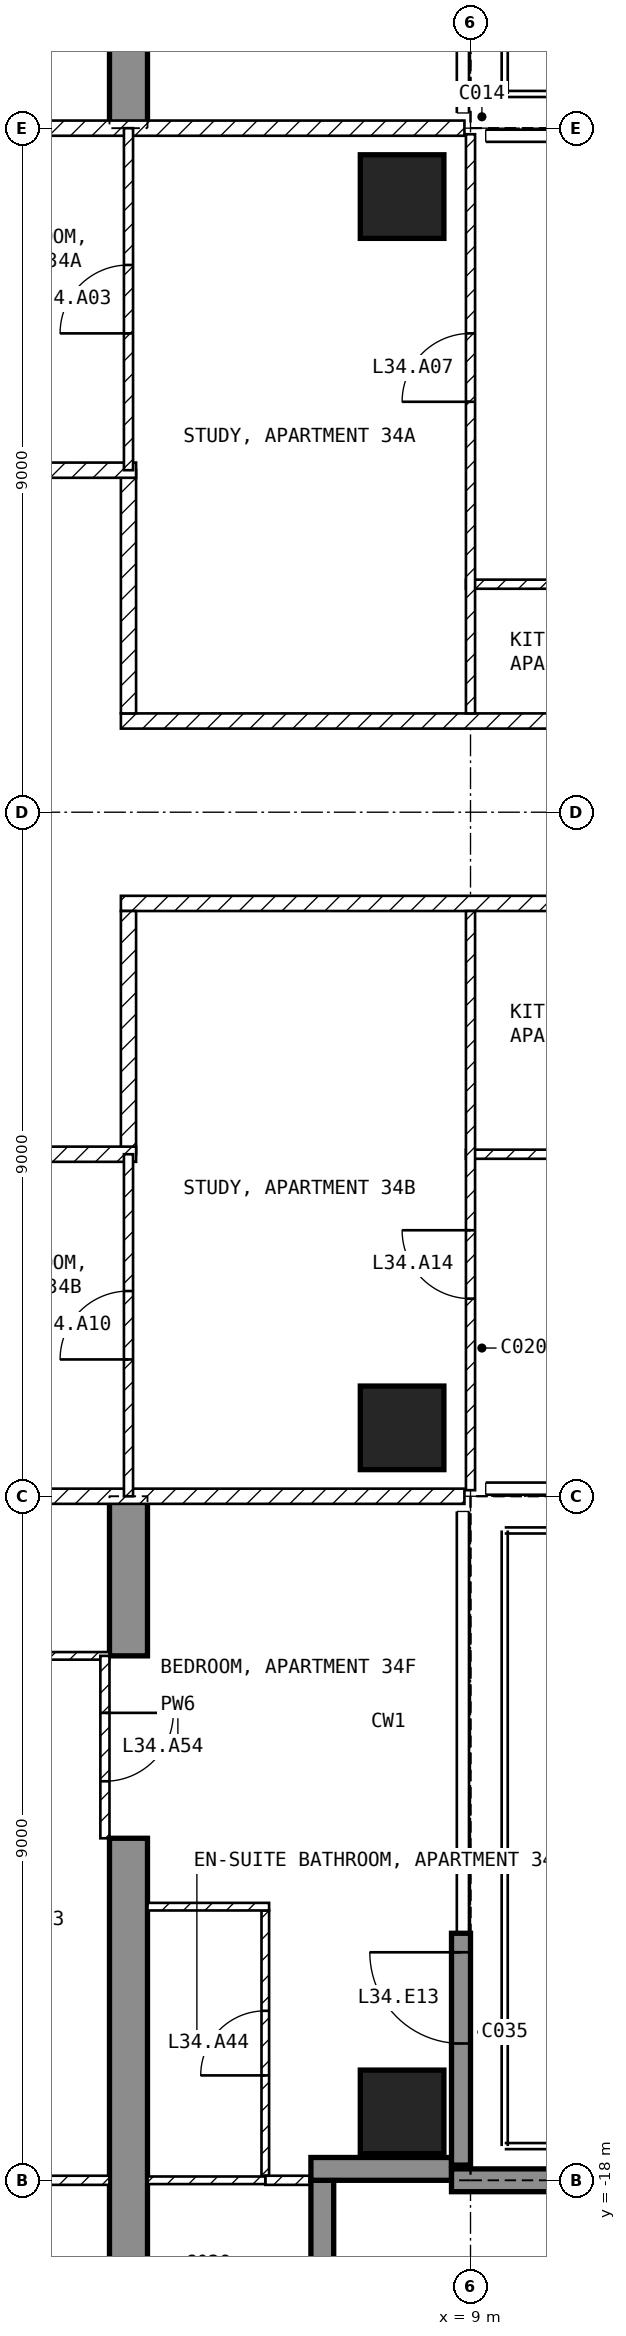
"""IFC4 building model, lengths in metres.
Left out: names, types, materials, properties, quantities, classifications, styles, units other than length and angle.
Written with IfcOpenShell. Run it as: python <this file> out.ifc"""

import sys

from ifc_helpers import new_model, si_unit, direction, frame, frame_2d, origin, origin_2d, place, context, subcontext, project, spatial, polyline, rectangle, outline, extrude, element, fill, save


model = new_model("IFC4")
c1 = context("Model", 3, precision=1e-05, world=origin(), true_north=direction((0.0, 1.0)))
c2 = subcontext(c1, "Body", "Model", "MODEL_VIEW")
j1 = project(units=[si_unit("LENGTHUNIT", "METRE"), si_unit("PLANEANGLEUNIT", "RADIAN")], contexts=[c1])
p1 = place(None, origin())
s1 = spatial("IfcSite", under=j1, at=p1, CompositionType="ELEMENT")
p2 = place(p1, origin())
s2 = spatial("IfcBuilding", under=s1, at=p2, CompositionType="ELEMENT")
p3 = place(p2, frame((0.0, 0.0, 140.9)))
s3 = spatial("IfcBuildingStorey", under=s2, at=p3, CompositionType="ELEMENT", Elevation=140.9)
for number, where, z_axis, x_axis in (
    (1, (8.1, -17.1, -0.25), (0.0, 0.0, 1.0), (1.0, 0.0, 0.0)),
    (2, (8.1, -8.1, -0.25), (0.0, 0.0, 1.0), (1.0, 0.0, 0.0)),
    (3, (8.1, 8.1, -0.25), (0.0, 0.0, 1.0), (1.0, 0.0, 0.0)),
):
    element("IfcColumn", number, at=place(p3, frame(where, z_axis=z_axis, x_axis=x_axis)), inside=s3, PredefinedType="COLUMN", context=c2, shape_type="SweptSolid", body=[
        extrude(rectangle(XDim=1.1, YDim=1.1, at=origin_2d()), origin(), (0.0, 0.0, 1.0), 3.5),
    ])
p4 = place(p3, frame((4.25, -20.15, -0.25), z_axis=(1.0, 0.0, 0.0), x_axis=(0.0, 1.0, 0.0)))
e4 = element("IfcWall", 4, at=p4, inside=s3, PredefinedType="SHEAR", context=c2, shape_type="SweptSolid", body=[
    extrude(outline(polyline([(0.0, 0.0), (6.65, 0.0), (6.65, 2.65), (9.05, 2.65), (9.05, 0.0), (11.15, 0.0), (11.15, 3.5), (0.0, 3.5), (0.0, 0.0)])), origin(), (0.0, 0.0, 1.0), 0.5),
])
p5 = place(p3, frame((4.25, 9.0, -0.25), z_axis=(1.0, 0.0, 0.0), x_axis=(0.0, 1.0, 0.0)))
e5 = element("IfcWall", 5, at=p5, inside=s3, PredefinedType="SHEAR", context=c2, shape_type="SweptSolid", body=[
    extrude(outline(polyline([(0.0, 0.0), (2.1, 0.0), (2.1, 2.65), (4.5, 2.65), (4.5, 0.0), (9.9, 0.0), (9.9, 2.65), (12.3, 2.65), (12.3, 0.0), (16.55, 0.0), (16.55, 3.5), (0.0, 3.5), (0.0, 0.0)])), origin(), (0.0, 0.0, 1.0), 0.5),
])
p6 = place(p3, frame((8.875, -17.8, 0.0), z_axis=(0.0, 0.0, 1.0), x_axis=(0.0, 1.0, 0.0)))
e6 = element("IfcWall", 6, at=p6, inside=s3, PredefinedType="SOLIDWALL", context=c2, shape_type="SweptSolid", body=[
    extrude(rectangle(XDim=3.05, YDim=0.25, at=frame_2d((1.525, 0.0))), origin(), (0.0, 0.0, 1.0), 3.25),
])
p7 = place(p6, frame((1.6, 0.0, 0.0)))
e7 = element("IfcOpeningElement", 7, at=p7, cuts=e6, PredefinedType="OPENING", context=c2, shape_type="SweptSolid", body=[
    extrude(rectangle(XDim=1.2, YDim=2.4, at=frame_2d((0.6, 1.2))), frame((0.0, 0.135, 0.0), z_axis=(0.0, -1.0, 0.0), x_axis=(1.0, 0.0, 0.0)), (0.0, 0.0, 1.0), 0.27),
])
p8 = place(p3, frame((7.05, -19.8, 0.0), z_axis=(0.0, 0.0, 1.0), x_axis=(0.0, 1.0, 0.0)))
e8 = element("IfcWall", 8, at=p8, inside=s3, PredefinedType="SOLIDWALL", context=c2, shape_type="SweptSolid", body=[
    extrude(rectangle(XDim=1.8, YDim=0.3, at=frame_2d((0.9, 0.0))), origin(), (0.0, 0.0, 1.0), 3.25),
])
p9 = place(p3, frame((6.9, -17.85, 0.0), z_axis=(0.0, 0.0, 1.0), x_axis=(1.0, 0.0, 0.0)))
e9 = element("IfcWall", 9, at=p9, inside=s3, PredefinedType="SOLIDWALL", context=c2, shape_type="SweptSolid", body=[
    extrude(rectangle(XDim=1.85, YDim=0.3, at=frame_2d((0.925, 0.0))), origin(), (0.0, 0.0, 1.0), 3.25),
])
p10 = place(p3, frame((8.75, -18.0, 0.0), z_axis=(0.0, 0.0, 1.0), x_axis=(1.0, 0.0, 0.0)))
e10 = element("IfcWall", 10, at=p10, inside=s3, PredefinedType="SOLIDWALL", context=c2, shape_type="SweptSolid", body=[
    extrude(rectangle(XDim=2.99, YDim=0.3, at=frame_2d((1.495, 0.0))), origin(), (0.0, 0.0, 1.0), 3.25),
])
p11 = place(p3, frame((4.4, 1.2, 0.0), z_axis=(0.0, 0.0, 1.0), x_axis=(1.0, 0.0, 0.0)))
e11 = element("IfcWall", 11, at=p11, inside=s3, PredefinedType="PARTITIONING", context=c2, shape_type="SweptSolid", body=[
    extrude(rectangle(XDim=17.2, YDim=0.2, at=frame_2d((8.6, 0.0))), origin(), (0.0, 0.0, 1.0), 3.25),
])
p12 = place(p11, frame((8.3, 0.0, 0.0)))
e12 = element("IfcOpeningElement", 12, at=p12, cuts=e11, PredefinedType="OPENING", context=c2, shape_type="SweptSolid", body=[
    extrude(rectangle(XDim=1.0, YDim=2.1, at=frame_2d((0.5, 1.05))), frame((0.0, 0.11, 0.0), z_axis=(0.0, -1.0, 0.0), x_axis=(1.0, 0.0, 0.0)), (0.0, 0.0, 1.0), 0.22),
])
p13 = place(p3, frame((4.5, 4.5, 0.0), z_axis=(0.0, 0.0, 1.0), x_axis=(0.0, -1.0, 0.0)))
e13 = element("IfcWall", 13, at=p13, inside=s3, PredefinedType="PARTITIONING", context=c2, shape_type="SweptSolid", body=[
    extrude(rectangle(XDim=3.2, YDim=0.2, at=frame_2d((1.6, 0.0))), origin(), (0.0, 0.0, 1.0), 3.25),
])
p14 = place(p3, frame((1.1, 4.5, 0.0), z_axis=(0.0, 0.0, 1.0), x_axis=(1.0, 0.0, 0.0)))
e14 = element("IfcWall", 14, at=p14, inside=s3, PredefinedType="PARTITIONING", context=c2, shape_type="SweptSolid", body=[
    extrude(rectangle(XDim=3.5, YDim=0.2, at=frame_2d((1.75, 0.0))), origin(), (0.0, 0.0, 1.0), 3.25),
])
p15 = place(p3, frame((21.6, -1.2, 0.0), z_axis=(0.0, 0.0, 1.0), x_axis=(-1.0, 0.0, 0.0)))
e15 = element("IfcWall", 15, at=p15, inside=s3, PredefinedType="PARTITIONING", context=c2, shape_type="SweptSolid", body=[
    extrude(rectangle(XDim=17.2, YDim=0.2, at=frame_2d((8.6, 0.0))), origin(), (0.0, 0.0, 1.0), 3.25),
])
p16 = place(p15, frame((7.9, 0.0, 0.0)))
e16 = element("IfcOpeningElement", 16, at=p16, cuts=e15, PredefinedType="OPENING", context=c2, shape_type="SweptSolid", body=[
    extrude(rectangle(XDim=1.0, YDim=2.1, at=frame_2d((0.5, 1.05))), frame((0.0, 0.11, 0.0), z_axis=(0.0, -1.0, 0.0), x_axis=(1.0, 0.0, 0.0)), (0.0, 0.0, 1.0), 0.22),
])
p17 = place(p3, frame((4.5, -1.3, 0.0), z_axis=(0.0, 0.0, 1.0), x_axis=(0.0, -1.0, 0.0)))
e17 = element("IfcWall", 17, at=p17, inside=s3, PredefinedType="PARTITIONING", context=c2, shape_type="SweptSolid", body=[
    extrude(rectangle(XDim=3.2, YDim=0.2, at=frame_2d((1.6, 0.0))), origin(), (0.0, 0.0, 1.0), 3.25),
])
p18 = place(p3, frame((4.6, -4.5, 0.0), z_axis=(0.0, 0.0, 1.0), x_axis=(-1.0, 0.0, 0.0)))
e18 = element("IfcWall", 18, at=p18, inside=s3, PredefinedType="PARTITIONING", context=c2, shape_type="SweptSolid", body=[
    extrude(rectangle(XDim=3.5, YDim=0.2, at=frame_2d((1.75, 0.0))), origin(), (0.0, 0.0, 1.0), 3.25),
])
p19 = place(p3, frame((-8.92, 9.0, 0.0), z_axis=(0.0, 0.0, 1.0), x_axis=(1.0, 0.0, 0.0)))
e19 = element("IfcWall", 19, at=p19, inside=s3, PredefinedType="PARTITIONING", context=c2, shape_type="SweptSolid", body=[
    extrude(rectangle(XDim=17.84, YDim=0.2, at=frame_2d((8.92, 0.0))), origin(), (0.0, 0.0, 1.0), 3.25),
])
p20 = place(p19, frame((8.42, 0.0, 0.0)))
e20 = element("IfcOpeningElement", 20, at=p20, cuts=e19, PredefinedType="OPENING", context=c2, shape_type="SweptSolid", body=[
    extrude(rectangle(XDim=1.0, YDim=2.1, at=frame_2d((0.5, 1.05))), frame((0.0, 0.11, 0.0), z_axis=(0.0, -1.0, 0.0), x_axis=(1.0, 0.0, 0.0)), (0.0, 0.0, 1.0), 0.22),
])
p21 = place(p3, frame((8.92, -9.0, 0.0), z_axis=(0.0, 0.0, 1.0), x_axis=(-1.0, 0.0, 0.0)))
e21 = element("IfcWall", 21, at=p21, inside=s3, PredefinedType="PARTITIONING", context=c2, shape_type="SweptSolid", body=[
    extrude(rectangle(XDim=17.84, YDim=0.2, at=frame_2d((8.92, 0.0))), origin(), (0.0, 0.0, 1.0), 3.25),
])
p22 = place(p21, frame((8.42, 0.0, 0.0)))
e22 = element("IfcOpeningElement", 22, at=p22, cuts=e21, PredefinedType="OPENING", context=c2, shape_type="SweptSolid", body=[
    extrude(rectangle(XDim=1.0, YDim=2.1, at=frame_2d((0.5, 1.05))), frame((0.0, 0.11, 0.0), z_axis=(0.0, -1.0, 0.0), x_axis=(1.0, 0.0, 0.0)), (0.0, 0.0, 1.0), 0.22),
])
p23 = place(p3, frame((8.94, 3.0, 0.0), z_axis=(0.0, 0.0, 1.0), x_axis=(1.0, 0.0, 0.0)))
e23 = element("IfcWall", 23, at=p23, inside=s3, PredefinedType="PARTITIONING", context=c2, shape_type="SweptSolid", body=[
    extrude(rectangle(XDim=7.86, YDim=0.12, at=frame_2d((3.93, 0.0))), origin(), (0.0, 0.0, 1.0), 3.25),
])
p24 = place(p23, frame((3.81, 0.0, 0.0)))
e24 = element("IfcOpeningElement", 24, at=p24, cuts=e23, PredefinedType="OPENING", context=c2, shape_type="SweptSolid", body=[
    extrude(rectangle(XDim=0.9, YDim=2.1, at=frame_2d((0.45, 1.05))), frame((0.0, 0.07, 0.0), z_axis=(0.0, -1.0, 0.0), x_axis=(1.0, 0.0, 0.0)), (0.0, 0.0, 1.0), 0.14),
])
p25 = place(p3, frame((9.0, 1.3, 0.0), z_axis=(0.0, 0.0, 1.0), x_axis=(0.0, 1.0, 0.0)))
e25 = element("IfcWall", 25, at=p25, inside=s3, PredefinedType="PARTITIONING", context=c2, shape_type="SweptSolid", body=[
    extrude(rectangle(XDim=7.62, YDim=0.12, at=frame_2d((3.81, 0.0))), origin(), (0.0, 0.0, 1.0), 3.25),
])
p26 = place(p25, frame((4.1, 0.0, 0.0)))
e26 = element("IfcOpeningElement", 26, at=p26, cuts=e25, PredefinedType="OPENING", context=c2, shape_type="SweptSolid", body=[
    extrude(rectangle(XDim=0.9, YDim=2.1, at=frame_2d((0.45, 1.05))), frame((0.0, 0.07, 0.0), z_axis=(0.0, -1.0, 0.0), x_axis=(1.0, 0.0, 0.0)), (0.0, 0.0, 1.0), 0.14),
])
p27 = place(p3, frame((4.5, 4.5, 0.0), z_axis=(0.0, 0.0, 1.0), x_axis=(0.0, 1.0, 0.0)))
e27 = element("IfcWall", 27, at=p27, inside=s3, PredefinedType="PARTITIONING", context=c2, shape_type="SweptSolid", body=[
    extrude(rectangle(XDim=4.5, YDim=0.12, at=frame_2d((2.25, 0.0))), origin(), (0.0, 0.0, 1.0), 3.25),
])
p28 = place(p27, frame((1.8, 0.0, 0.0)))
e28 = element("IfcOpeningElement", 28, at=p28, cuts=e27, PredefinedType="OPENING", context=c2, shape_type="SweptSolid", body=[
    extrude(rectangle(XDim=0.9, YDim=2.1, at=frame_2d((0.45, 1.05))), frame((0.0, 0.07, 0.0), z_axis=(0.0, -1.0, 0.0), x_axis=(1.0, 0.0, 0.0)), (0.0, 0.0, 1.0), 0.14),
])
p29 = place(p3, frame((16.8, -4.5, 0.0), z_axis=(0.0, 0.0, 1.0), x_axis=(-1.0, 0.0, 0.0)))
e29 = element("IfcWall", 29, at=p29, inside=s3, PredefinedType="PARTITIONING", context=c2, shape_type="SweptSolid", body=[
    extrude(rectangle(XDim=7.86, YDim=0.12, at=frame_2d((3.93, 0.0))), origin(), (0.0, 0.0, 1.0), 3.25),
])
p30 = place(p29, frame((3.15, 0.0, 0.0)))
e30 = element("IfcOpeningElement", 30, at=p30, cuts=e29, PredefinedType="OPENING", context=c2, shape_type="SweptSolid", body=[
    extrude(rectangle(XDim=0.9, YDim=2.1, at=frame_2d((0.45, 1.05))), frame((0.0, 0.07, 0.0), z_axis=(0.0, -1.0, 0.0), x_axis=(1.0, 0.0, 0.0)), (0.0, 0.0, 1.0), 0.14),
])
p31 = place(p3, frame((9.0, -8.92, 0.0), z_axis=(0.0, 0.0, 1.0), x_axis=(0.0, 1.0, 0.0)))
e31 = element("IfcWall", 31, at=p31, inside=s3, PredefinedType="PARTITIONING", context=c2, shape_type="SweptSolid", body=[
    extrude(rectangle(XDim=7.62, YDim=0.12, at=frame_2d((3.81, 0.0))), origin(), (0.0, 0.0, 1.0), 3.25),
])
p32 = place(p31, frame((2.52, 0.0, 0.0)))
e32 = element("IfcOpeningElement", 32, at=p32, cuts=e31, PredefinedType="OPENING", context=c2, shape_type="SweptSolid", body=[
    extrude(rectangle(XDim=0.9, YDim=2.1, at=frame_2d((0.45, 1.05))), frame((0.0, 0.07, 0.0), z_axis=(0.0, -1.0, 0.0), x_axis=(1.0, 0.0, 0.0)), (0.0, 0.0, 1.0), 0.14),
])
p33 = place(p3, frame((4.5, -9.0, 0.0), z_axis=(0.0, 0.0, 1.0), x_axis=(0.0, 1.0, 0.0)))
e33 = element("IfcWall", 33, at=p33, inside=s3, PredefinedType="PARTITIONING", context=c2, shape_type="SweptSolid", body=[
    extrude(rectangle(XDim=4.5, YDim=0.12, at=frame_2d((2.25, 0.0))), origin(), (0.0, 0.0, 1.0), 3.25),
])
p34 = place(p33, frame((1.8, 0.0, 0.0)))
e34 = element("IfcOpeningElement", 34, at=p34, cuts=e33, PredefinedType="OPENING", context=c2, shape_type="SweptSolid", body=[
    extrude(rectangle(XDim=0.9, YDim=2.1, at=frame_2d((0.45, 1.05))), frame((0.0, 0.07, 0.0), z_axis=(0.0, -1.0, 0.0), x_axis=(1.0, 0.0, 0.0)), (0.0, 0.0, 1.0), 0.14),
])
p35 = place(p3, frame((4.25, -11.1, 0.0), z_axis=(0.0, 0.0, 1.0), x_axis=(-1.0, 0.0, 0.0)))
e35 = element("IfcWall", 35, at=p35, inside=s3, PredefinedType="PARTITIONING", context=c2, shape_type="SweptSolid", body=[
    extrude(rectangle(XDim=2.15, YDim=0.1, at=frame_2d((1.075, 0.0))), origin(), (0.0, 0.0, 1.0), 3.25),
])
p36 = place(p3, frame((4.25, -18.0, 0.0), z_axis=(0.0, 0.0, 1.0), x_axis=(-1.0, 0.0, 0.0)))
e36 = element("IfcWall", 36, at=p36, inside=s3, PredefinedType="PARTITIONING", context=c2, shape_type="SweptSolid", body=[
    extrude(rectangle(XDim=8.5, YDim=0.12, at=frame_2d((4.25, 0.0))), origin(), (0.0, 0.0, 1.0), 3.25),
])
p37 = place(p36, frame((1.925, 0.0, 0.0)))
e37 = element("IfcOpeningElement", 37, at=p37, cuts=e36, PredefinedType="OPENING", context=c2, shape_type="SweptSolid", body=[
    extrude(rectangle(XDim=0.9, YDim=2.1, at=frame_2d((0.45, 1.05))), frame((0.0, 0.07, 0.0), z_axis=(0.0, -1.0, 0.0), x_axis=(1.0, 0.0, 0.0)), (0.0, 0.0, 1.0), 0.14),
])
p38 = place(p3, frame((6.3, -17.94, 0.0), z_axis=(0.0, 0.0, 1.0), x_axis=(0.0, 1.0, 0.0)))
e38 = element("IfcWall", 38, at=p38, inside=s3, PredefinedType="PARTITIONING", context=c2, shape_type="SweptSolid", body=[
    extrude(rectangle(XDim=3.49, YDim=0.1, at=frame_2d((1.745, 0.0))), origin(), (0.0, 0.0, 1.0), 3.25),
])
p39 = place(p38, frame((1.32, 0.0, 0.0)))
e39 = element("IfcOpeningElement", 39, at=p39, cuts=e38, PredefinedType="OPENING", context=c2, shape_type="SweptSolid", body=[
    extrude(rectangle(XDim=0.85, YDim=2.1, at=frame_2d((0.425, 1.05))), frame((0.0, 0.06, 0.0), z_axis=(0.0, -1.0, 0.0), x_axis=(1.0, 0.0, 0.0)), (0.0, 0.0, 1.0), 0.12),
])
p40 = place(p3, frame((6.35, -14.4, 0.0), z_axis=(0.0, 0.0, 1.0), x_axis=(-1.0, 0.0, 0.0)))
e40 = element("IfcWall", 40, at=p40, inside=s3, PredefinedType="PARTITIONING", context=c2, shape_type="SweptSolid", body=[
    extrude(rectangle(XDim=1.6, YDim=0.1, at=frame_2d((0.8, 0.0))), origin(), (0.0, 0.0, 1.0), 3.25),
])
p41 = place(p3, frame((7.12, -18.0, 0.0), z_axis=(0.0, 0.0, 1.0), x_axis=(-1.0, 0.0, 0.0)))
e41 = element("IfcWall", 41, at=p41, inside=s3, PredefinedType="PARTITIONING", context=c2, shape_type="SweptSolid", body=[
    extrude(rectangle(XDim=0.82, YDim=0.12, at=frame_2d((0.41, 0.0))), origin(), (0.0, 0.0, 1.0), 3.25),
])
p42 = place(p3, frame((6.3, -18.0, 0.0), z_axis=(0.0, 0.0, 1.0), x_axis=(-1.0, 0.0, 0.0)))
e42 = element("IfcWall", 42, at=p42, inside=s3, PredefinedType="PARTITIONING", context=c2, shape_type="SweptSolid", body=[
    extrude(rectangle(XDim=1.55, YDim=0.1, at=frame_2d((0.775, 0.0))), origin(), (0.0, 0.0, 1.0), 3.25),
])
p43 = place(p3, frame((4.19, -11.1, 0.0), z_axis=(0.0, 0.0, 1.0), x_axis=(0.0, -1.0, 0.0)))
e43 = element("IfcWall", 43, at=p43, inside=s3, PredefinedType="PARTITIONING", context=c2, shape_type="SweptSolid", body=[
    extrude(rectangle(XDim=2.4, YDim=0.12, at=frame_2d((1.2, 0.0))), origin(), (0.0, 0.0, 1.0), 2.4),
])
p44 = place(p43, frame((0.75, 0.0, 0.0)))
e44 = element("IfcOpeningElement", 44, at=p44, cuts=e43, PredefinedType="OPENING", context=c2, shape_type="SweptSolid", body=[
    extrude(rectangle(XDim=0.9, YDim=2.1, at=frame_2d((0.45, 1.05))), frame((0.0, 0.07, 0.0), z_axis=(0.0, -1.0, 0.0), x_axis=(1.0, 0.0, 0.0)), (0.0, 0.0, 1.0), 0.14),
])
p45 = place(p7, origin())
e45 = element("IfcDoor", 45, at=p45, inside=s3, OperationType="SINGLE_SWING_RIGHT", PredefinedType="DOOR", context=c2, shape_type="SweptSolid", body=[
    extrude(rectangle(XDim=1.2, YDim=2.4, at=frame_2d((0.6, 1.2))), frame((0.0, 0.025, 0.0), z_axis=(0.0, -1.0, 0.0), x_axis=(1.0, 0.0, 0.0)), (0.0, 0.0, 1.0), 0.05),
])
fill(e7, e45)
p46 = place(p28, origin())
e46 = element("IfcDoor", 46, at=p46, inside=s3, OperationType="SINGLE_SWING_LEFT", PredefinedType="DOOR", context=c2, shape_type="SweptSolid", body=[
    extrude(rectangle(XDim=0.9, YDim=2.1, at=frame_2d((0.45, 1.05))), frame((0.0, 0.025, 0.0), z_axis=(0.0, -1.0, 0.0), x_axis=(1.0, 0.0, 0.0)), (0.0, 0.0, 1.0), 0.05),
])
fill(e28, e46)
p47 = place(p26, origin())
e47 = element("IfcDoor", 47, at=p47, inside=s3, OperationType="SINGLE_SWING_LEFT", PredefinedType="DOOR", context=c2, shape_type="SweptSolid", body=[
    extrude(rectangle(XDim=0.9, YDim=2.1, at=frame_2d((0.45, 1.05))), frame((0.0, 0.025, 0.0), z_axis=(0.0, -1.0, 0.0), x_axis=(1.0, 0.0, 0.0)), (0.0, 0.0, 1.0), 0.05),
])
fill(e26, e47)
p48 = place(p34, origin())
e48 = element("IfcDoor", 48, at=p48, inside=s3, OperationType="SINGLE_SWING_LEFT", PredefinedType="DOOR", context=c2, shape_type="SweptSolid", body=[
    extrude(rectangle(XDim=0.9, YDim=2.1, at=frame_2d((0.45, 1.05))), frame((0.0, 0.025, 0.0), z_axis=(0.0, -1.0, 0.0), x_axis=(1.0, 0.0, 0.0)), (0.0, 0.0, 1.0), 0.05),
])
fill(e34, e48)
p49 = place(p32, origin())
e49 = element("IfcDoor", 49, at=p49, inside=s3, OperationType="SINGLE_SWING_RIGHT", PredefinedType="DOOR", context=c2, shape_type="SweptSolid", body=[
    extrude(rectangle(XDim=0.9, YDim=2.1, at=frame_2d((0.45, 1.05))), frame((0.0, 0.025, 0.0), z_axis=(0.0, -1.0, 0.0), x_axis=(1.0, 0.0, 0.0)), (0.0, 0.0, 1.0), 0.05),
])
fill(e32, e49)
p50 = place(p39, origin())
e50 = element("IfcDoor", 50, at=p50, inside=s3, OperationType="SINGLE_SWING_LEFT", PredefinedType="DOOR", context=c2, shape_type="SweptSolid", body=[
    extrude(rectangle(XDim=0.85, YDim=2.1, at=frame_2d((0.425, 1.05))), frame((0.0, 0.025, 0.0), z_axis=(0.0, -1.0, 0.0), x_axis=(1.0, 0.0, 0.0)), (0.0, 0.0, 1.0), 0.05),
])
fill(e39, e50)
p51 = place(p44, origin())
e51 = element("IfcDoor", 51, at=p51, inside=s3, OperationType="SINGLE_SWING_LEFT", PredefinedType="DOOR", context=c2, shape_type="SweptSolid", body=[
    extrude(rectangle(XDim=0.9, YDim=2.1, at=frame_2d((0.45, 1.05))), frame((0.0, 0.025, 0.0), z_axis=(0.0, -1.0, 0.0), x_axis=(1.0, 0.0, 0.0)), (0.0, 0.0, 1.0), 0.05),
])
fill(e44, e51)
save(model, sys.argv[1])
